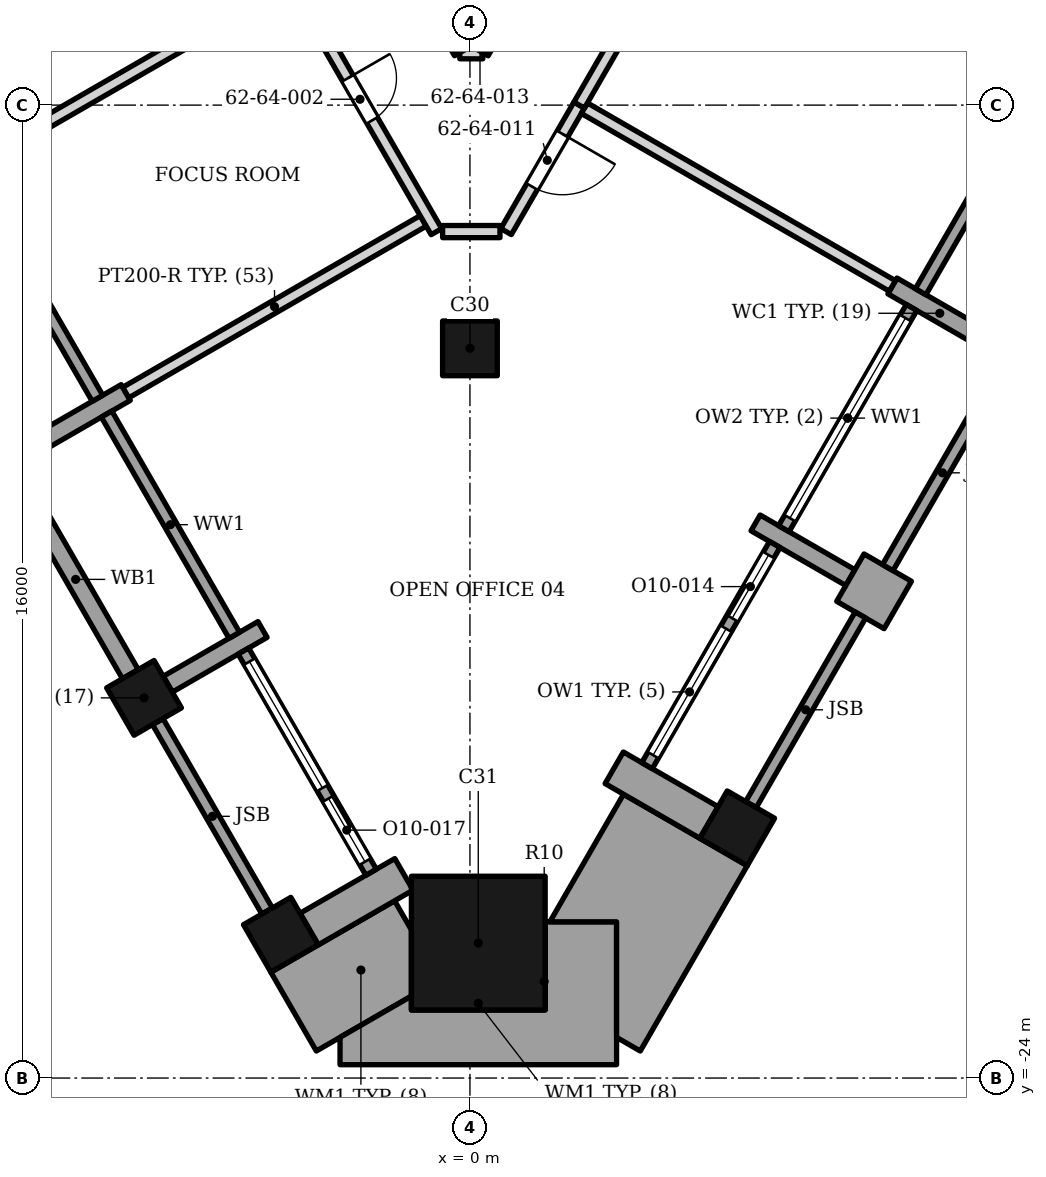
"""IFC4 building model, lengths in metres.
Left out: names, types, materials, properties, quantities, classifications, styles, units other than length and angle.
Written with IfcOpenShell. Run it as: python <this file> out.ifc"""

import sys

from ifc_helpers import new_model, si_unit, direction, frame, frame_2d, origin, origin_2d, place, context, subcontext, project, spatial, polyline, rectangle, outline, extrude, element, fill, save


model = new_model("IFC4")
c1 = context("Model", 3, precision=1e-05, world=origin(), true_north=direction((0.0, 1.0)))
c2 = subcontext(c1, "Body", "Model", "MODEL_VIEW")
j1 = project(units=[si_unit("LENGTHUNIT", "METRE"), si_unit("PLANEANGLEUNIT", "RADIAN")], contexts=[c1])
p1 = place(None, origin())
s1 = spatial("IfcSite", under=j1, at=p1, CompositionType="ELEMENT")
p2 = place(p1, origin())
s2 = spatial("IfcBuilding", under=s1, at=p2, CompositionType="ELEMENT")
p3 = place(p2, frame((0.0, 0.0, 259.9)))
s3 = spatial("IfcBuildingStorey", under=s2, at=p3, CompositionType="ELEMENT", Elevation=259.9)
p4 = place(p3, frame((0.137, -21.781, 0.0), z_axis=(0.0, 0.0, 1.0), x_axis=(0.0, 1.0, 0.0)))
e1 = element("IfcColumn", 1, at=p4, inside=s3, PredefinedType="COLUMN", context=c2, shape_type="SweptSolid", body=[
    extrude(rectangle(XDim=2.2, YDim=2.2, at=origin_2d()), origin(), (0.0, 0.0, 1.0), 3.9),
])
for number, where, z_axis, x_axis in (
    (2, (0.0, -12.0, 0.0), (0.0, 0.0, 1.0), (1.0, 0.0, 0.0)),
    (3, (-5.36, -17.748, 0.0), (0.0, 0.0, 1.0), (0.5, -0.866, 0.0)),
    (4, (-3.11, -21.643, 0.0), (0.0, 0.0, 1.0), (0.5, -0.866, 0.0)),
    (5, (4.396, -19.893, 0.0), (0.0, 0.0, 1.0), (0.5, 0.866, 0.0)),
):
    element("IfcColumn", number, at=place(p3, frame(where, z_axis=z_axis, x_axis=x_axis)), inside=s3, PredefinedType="COLUMN", context=c2, shape_type="SweptSolid", body=[
        extrude(rectangle(XDim=0.9, YDim=0.9, at=origin_2d()), origin(), (0.0, 0.0, 1.0), 3.9),
    ])
for number, where, z_axis, x_axis in (
    (6, (-7.22, -13.626, 0.0), (0.0, 0.0, 1.0), (0.866, 0.5, 0.0)),
    (7, (-4.97, -17.523, 0.0), (0.0, 0.0, 1.0), (0.866, 0.5, 0.0)),
):
    element("IfcWall", number, at=place(p3, frame(where, z_axis=z_axis, x_axis=x_axis)), inside=s3, PredefinedType="SOLIDWALL", context=c2, shape_type="SweptSolid", body=[
        extrude(rectangle(XDim=1.8, YDim=0.3, at=frame_2d((0.9, 0.0))), origin(), (0.0, 0.0, 1.0), 3.0),
    ])
p5 = place(p3, frame((-2.645, -21.55, 0.0), z_axis=(0.0, 0.0, 1.0), x_axis=(0.866047807691, 0.499961193289, 0.0)))
e8 = element("IfcWall", 8, at=p5, inside=s3, PredefinedType="SOLIDWALL", context=c2, shape_type="SweptSolid", body=[
    extrude(rectangle(XDim=1.8, YDim=0.6, at=frame_2d((0.9, 0.0))), origin(), (0.0, 0.0, 1.0), 3.0),
])
p6 = place(p3, frame((-8.226, -9.184, 0.0), z_axis=(0.0, 0.0, 1.0), x_axis=(0.49998411664, -0.866034573852, 0.0)))
e9 = element("IfcWall", 9, at=p6, inside=s3, PredefinedType="ELEMENTEDWALL", context=c2, shape_type="SweptSolid", body=[
    extrude(rectangle(XDim=4.2, YDim=0.2, at=frame_2d((2.1, 0.0))), origin(), (0.0, 0.0, 1.0), 2.95),
])
p7 = place(p3, frame((-5.585, -17.358, 0.0), z_axis=(0.0, 0.0, 1.0), x_axis=(-0.50001992892, 0.866013897511, 0.0)))
e10 = element("IfcWall", 10, at=p7, inside=s3, PredefinedType="SOLIDWALL", context=c2, shape_type="SweptSolid", body=[
    extrude(rectangle(XDim=3.599, YDim=0.3, at=frame_2d((1.8, 0.0))), origin(), (0.0, 0.0, 1.0), 3.0),
])
p8 = place(p3, frame((-5.976, -13.081, 0.0), z_axis=(0.0, 0.0, 1.0), x_axis=(0.499958946799, -0.866049104564, 0.0)))
e11 = element("IfcWall", 11, at=p8, inside=s3, PredefinedType="ELEMENTEDWALL", context=c2, shape_type="SweptSolid", body=[
    extrude(rectangle(XDim=4.2, YDim=0.2, at=frame_2d((2.1, 0.0))), origin(), (0.0, 0.0, 1.0), 3.0),
])
p9 = place(p3, origin())
e12 = element("IfcWall", 12, at=p9, inside=s3, PredefinedType="SOLIDWALL", context=c2, shape_type="SweptSolid", body=[
    extrude(outline(polyline([(-5.221, -18.188), (-3.422, -21.304), (-3.249, -21.204), (-5.048, -18.088), (-5.221, -18.188)])), origin(), (0.0, 0.0, 1.0), 3.0),
])
p10 = place(p3, frame((-3.726, -16.978, 0.0), z_axis=(0.0, 0.0, 1.0), x_axis=(0.49998411664, -0.866034573852, 0.0)))
e13 = element("IfcWall", 13, at=p10, inside=s3, PredefinedType="ELEMENTEDWALL", context=c2, shape_type="SweptSolid", body=[
    extrude(rectangle(XDim=4.2, YDim=0.2, at=frame_2d((2.1, 0.0))), origin(), (0.0, 0.0, 1.0), 3.0),
])
p11 = place(p10, frame((0.2, 0.0, 0.45)))
e14 = element("IfcOpeningElement", 14, at=p11, cuts=e13, PredefinedType="OPENING", context=c2, shape_type="SweptSolid", body=[
    extrude(rectangle(XDim=2.4, YDim=2.25, at=frame_2d((1.2, 1.125))), frame((0.0, 0.11, 0.0), z_axis=(0.0, -1.0, 0.0), x_axis=(1.0, 0.0, 0.0)), (0.0, 0.0, 1.0), 0.22),
])
p12 = place(p10, frame((2.8, 0.0, 0.0)))
e15 = element("IfcOpeningElement", 15, at=p12, cuts=e13, PredefinedType="OPENING", context=c2, shape_type="SweptSolid", body=[
    extrude(rectangle(XDim=1.2, YDim=2.7, at=frame_2d((0.6, 1.35))), frame((0.0, 0.11, 0.0), z_axis=(0.0, -1.0, 0.0), x_axis=(1.0, 0.0, 0.0)), (0.0, 0.0, 1.0), 0.22),
])
p13 = place(p3, frame((3.932, -19.797, 0.0), z_axis=(0.0, 0.0, 1.0), x_axis=(-0.866047807691, 0.499961193289, 0.0)))
e16 = element("IfcWall", 16, at=p13, inside=s3, PredefinedType="SOLIDWALL", context=c2, shape_type="SweptSolid", body=[
    extrude(rectangle(XDim=1.8, YDim=0.6, at=frame_2d((0.9, 0.0))), origin(), (0.0, 0.0, 1.0), 3.0),
])
p14 = place(p3, frame((6.257, -15.771, 0.0), z_axis=(0.0, 0.0, 1.0), x_axis=(0.866013897511, -0.50001992892, 0.0)))
e17 = element("IfcWall", 17, at=p14, inside=s3, PredefinedType="SOLIDWALL", context=c2, shape_type="SweptSolid", body=[
    extrude(rectangle(XDim=0.9, YDim=0.9, at=frame_2d((0.45, 0.0))), origin(), (0.0, 0.0, 1.0), 3.0),
])
p15 = place(p3, frame((4.698, -14.87, 0.0), z_axis=(0.0, 0.0, 1.0), x_axis=(0.865989075817, -0.500062916607, 0.0)))
e18 = element("IfcWall", 18, at=p15, inside=s3, PredefinedType="SOLIDWALL", context=c2, shape_type="SweptSolid", body=[
    extrude(rectangle(XDim=1.8, YDim=0.3, at=frame_2d((0.9, 0.0))), origin(), (0.0, 0.0, 1.0), 3.0),
])
p16 = place(p3, frame((6.948, -10.973, 0.0), z_axis=(0.0, 0.0, 1.0), x_axis=(0.866038726271, -0.499976924066, 0.0)))
e19 = element("IfcWall", 19, at=p16, inside=s3, PredefinedType="SOLIDWALL", context=c2, shape_type="SweptSolid", body=[
    extrude(rectangle(XDim=1.799, YDim=0.3, at=frame_2d((0.9, 0.0))), origin(), (0.0, 0.0, 1.0), 2.95),
])
p17 = place(p3, frame((4.622, -19.503, 0.0), z_axis=(0.0, 0.0, 1.0), x_axis=(0.499961193289, 0.866047807691, 0.0)))
e20 = element("IfcWall", 20, at=p17, inside=s3, PredefinedType="SOLIDWALL", context=c2, shape_type="SweptSolid", body=[
    extrude(rectangle(XDim=3.6, YDim=0.2, at=frame_2d((1.8, 0.0))), origin(), (0.0, 0.0, 1.0), 3.0),
])
p18 = place(p3, frame((2.913, -18.863, 0.0), z_axis=(0.0, 0.0, 1.0), x_axis=(0.500002543286, 0.866023935413, 0.0)))
e21 = element("IfcWall", 21, at=p18, inside=s3, PredefinedType="ELEMENTEDWALL", context=c2, shape_type="SweptSolid", body=[
    extrude(rectangle(XDim=4.2, YDim=0.2, at=frame_2d((2.1, 0.0))), origin(), (0.0, 0.0, 1.0), 3.0),
])
p19 = place(p18, frame((0.2, 0.0, 0.45)))
e22 = element("IfcOpeningElement", 22, at=p19, cuts=e21, PredefinedType="OPENING", context=c2, shape_type="SweptSolid", body=[
    extrude(rectangle(XDim=2.4, YDim=2.25, at=frame_2d((1.2, 1.125))), frame((0.0, 0.11, 0.0), z_axis=(0.0, -1.0, 0.0), x_axis=(1.0, 0.0, 0.0)), (0.0, 0.0, 1.0), 0.22),
])
p20 = place(p18, frame((2.8, 0.0, 0.0)))
e23 = element("IfcOpeningElement", 23, at=p20, cuts=e21, PredefinedType="OPENING", context=c2, shape_type="SweptSolid", body=[
    extrude(rectangle(XDim=1.2, YDim=2.7, at=frame_2d((0.6, 1.35))), frame((0.0, 0.11, 0.0), z_axis=(0.0, -1.0, 0.0), x_axis=(1.0, 0.0, 0.0)), (0.0, 0.0, 1.0), 0.22),
])
p21 = place(p3, frame((6.872, -15.606, 0.0), z_axis=(0.0, 0.0, 1.0), x_axis=(0.499961193289, 0.866047807691, 0.0)))
e24 = element("IfcWall", 24, at=p21, inside=s3, PredefinedType="SOLIDWALL", context=c2, shape_type="SweptSolid", body=[
    extrude(rectangle(XDim=3.6, YDim=0.2, at=frame_2d((1.8, 0.0))), origin(), (0.0, 0.0, 1.0), 3.0),
])
p22 = place(p3, frame((5.163, -14.966, 0.0), z_axis=(0.0, 0.0, 1.0), x_axis=(0.500027713859, 0.866009402589, 0.0)))
e25 = element("IfcWall", 25, at=p22, inside=s3, PredefinedType="ELEMENTEDWALL", context=c2, shape_type="SweptSolid", body=[
    extrude(rectangle(XDim=4.2, YDim=0.2, at=frame_2d((2.1, 0.0))), origin(), (0.0, 0.0, 1.0), 2.95),
])
p23 = place(p22, frame((0.2, 0.0, 0.45)))
e26 = element("IfcOpeningElement", 26, at=p23, cuts=e25, PredefinedType="OPENING", context=c2, shape_type="SweptSolid", body=[
    extrude(rectangle(XDim=3.8, YDim=2.25, at=frame_2d((1.9, 1.125))), frame((0.0, 0.11, 0.0), z_axis=(0.0, -1.0, 0.0), x_axis=(1.0, 0.0, 0.0)), (0.0, 0.0, 1.0), 0.22),
])
p24 = place(p3, frame((7.413, -11.068, 0.0), z_axis=(0.0, 0.0, 1.0), x_axis=(0.500027713859, 0.866009402589, 0.0)))
e27 = element("IfcWall", 27, at=p24, inside=s3, PredefinedType="ELEMENTEDWALL", context=c2, shape_type="SweptSolid", body=[
    extrude(rectangle(XDim=4.2, YDim=0.2, at=frame_2d((2.1, 0.0))), origin(), (0.0, 0.0, 1.0), 3.0),
])
p25 = place(p3, origin())
e28 = element("IfcWall", 28, at=p25, inside=s3, PredefinedType="SOLIDWALL", context=c2, shape_type="SweptSolid", body=[
    extrude(outline(polyline([(-1.239, -21.085), (-3.274, -22.26), (-2.526, -23.556), (-0.963, -22.653), (-0.963, -21.563), (-1.239, -21.085)])), origin(), (0.0, 0.0, 1.0), 3.0),
])
p26 = place(p3, origin())
e29 = element("IfcWall", 29, at=p26, inside=s3, PredefinedType="SOLIDWALL", context=c2, shape_type="SweptSolid", body=[
    extrude(outline(polyline([(-0.963, -22.881), (-0.963, -22.653), (-2.136, -23.331), (-2.136, -23.781), (2.411, -23.781), (2.411, -21.431), (1.237, -21.431), (1.237, -22.881), (-0.963, -22.881)])), origin(), (0.0, 0.0, 1.0), 3.0),
])
p27 = place(p3, origin())
e30 = element("IfcWall", 30, at=p27, inside=s3, PredefinedType="SOLIDWALL", context=c2, shape_type="SweptSolid", body=[
    extrude(outline(polyline([(4.561, -20.507), (2.526, -19.332), (1.314, -21.431), (2.411, -21.431), (2.411, -23.331), (2.801, -23.556), (4.561, -20.507)])), origin(), (0.0, 0.0, 1.0), 3.0),
])
p28 = place(p3, frame((-5.661, -12.727, 0.0), z_axis=(0.0, 0.0, 1.0), x_axis=(0.866171915947, 0.499746147583, 0.0)))
e31 = element("IfcWall", 31, at=p28, inside=s3, PredefinedType="PARTITIONING", context=c2, shape_type="SweptSolid", body=[
    extrude(rectangle(XDim=5.649, YDim=0.2, at=frame_2d((2.825, 0.0))), origin(), (0.0, 0.0, 1.0), 2.884),
])
p29 = place(p3, frame((-7.433, 1.839, 0.0), z_axis=(0.0, 0.0, 1.0), x_axis=(0.500005992518, -0.866021943975, 0.0)))
e32 = element("IfcWall", 32, at=p29, inside=s3, PredefinedType="PARTITIONING", context=c2, shape_type="SweptSolid", body=[
    extrude(rectangle(XDim=13.764, YDim=0.2, at=frame_2d((6.882, 0.0))), origin(), (0.0, 0.0, 1.0), 2.884),
])
p30 = place(p29, frame((3.7, 0.0, 0.0)))
e33 = element("IfcOpeningElement", 33, at=p30, cuts=e32, PredefinedType="OPENING", context=c2, shape_type="SweptSolid", body=[
    extrude(rectangle(XDim=1.6, YDim=2.1, at=frame_2d((0.8, 1.05))), frame((0.0, 0.11, 0.0), z_axis=(0.0, -1.0, 0.0), x_axis=(1.0, 0.0, 0.0)), (0.0, 0.0, 1.0), 0.22),
])
p31 = place(p29, frame((10.85, 0.0, 0.0)))
e34 = element("IfcOpeningElement", 34, at=p31, cuts=e32, PredefinedType="OPENING", context=c2, shape_type="SweptSolid", body=[
    extrude(rectangle(XDim=0.8, YDim=2.1, at=frame_2d((0.4, 1.05))), frame((0.0, 0.11, 0.0), z_axis=(0.0, -1.0, 0.0), x_axis=(1.0, 0.0, 0.0)), (0.0, 0.0, 1.0), 0.22),
])
p32 = place(p3, frame((-0.449, -10.08, 0.0), z_axis=(0.0, 0.0, 1.0), x_axis=(0.999999966511, 0.000258799163, 0.0)))
e35 = element("IfcWall", 35, at=p32, inside=s3, PredefinedType="PARTITIONING", context=c2, shape_type="SweptSolid", body=[
    extrude(rectangle(XDim=0.943, YDim=0.2, at=frame_2d((0.472, 0.0))), origin(), (0.0, 0.0, 1.0), 3.73),
])
p33 = place(p3, frame((0.594, -10.08, 0.0), z_axis=(0.0, 0.0, 1.0), x_axis=(0.500575540498, 0.865692860231, 0.0)))
e36 = element("IfcWall", 36, at=p33, inside=s3, PredefinedType="PARTITIONING", context=c2, shape_type="SweptSolid", body=[
    extrude(rectangle(XDim=2.403, YDim=0.2, at=frame_2d((1.201, 0.0))), origin(), (0.0, 0.0, 1.0), 3.73),
])
p34 = place(p33, frame((0.854, 0.0, 0.0)))
e37 = element("IfcOpeningElement", 37, at=p34, cuts=e36, PredefinedType="OPENING", context=c2, shape_type="SweptSolid", body=[
    extrude(rectangle(XDim=1.0, YDim=2.1, at=frame_2d((0.5, 1.05))), frame((0.0, 0.11, 0.0), z_axis=(0.0, -1.0, 0.0), x_axis=(1.0, 0.0, 0.0)), (0.0, 0.0, 1.0), 0.22),
])
p35 = place(p3, frame((1.881, -8.05, 0.0), z_axis=(0.0, 0.0, 1.0), x_axis=(0.86614736797, -0.499788692307, 0.0)))
e38 = element("IfcWall", 38, at=p35, inside=s3, PredefinedType="PARTITIONING", context=c2, shape_type="SweptSolid", body=[
    extrude(rectangle(XDim=5.85, YDim=0.2, at=frame_2d((2.925, 0.0))), origin(), (0.0, 0.0, 1.0), 2.884),
])
p36 = place(p3, frame((-0.167, -7.138, 0.0), z_axis=(0.0, 0.0, 1.0), x_axis=(0.999996687272, -0.002573994047, 0.0)))
e39 = element("IfcWall", 39, at=p36, inside=s3, PredefinedType="PARTITIONING", context=c2, shape_type="SweptSolid", body=[
    extrude(rectangle(XDim=0.379, YDim=0.2, at=frame_2d((0.19, 0.0))), origin(), (0.0, 0.0, 1.0), 3.73),
])
p37 = place(p3, frame((0.212, -7.139, 0.0), z_axis=(0.0, 0.0, 1.0), x_axis=(0.499990649477, 0.866030802244, 0.0)))
e40 = element("IfcWall", 40, at=p37, inside=s3, PredefinedType="PARTITIONING", context=c2, shape_type="SweptSolid", body=[
    extrude(rectangle(XDim=12.135, YDim=0.2, at=frame_2d((6.067, 0.0))), origin(), (0.0, 0.0, 1.0), 2.884),
])
p38 = place(p37, frame((5.567, 0.0, 0.0)))
e41 = element("IfcOpeningElement", 41, at=p38, cuts=e40, PredefinedType="OPENING", context=c2, shape_type="SweptSolid", body=[
    extrude(rectangle(XDim=1.0, YDim=2.1, at=frame_2d((0.5, 1.05))), frame((0.0, 0.11, 0.0), z_axis=(0.0, -1.0, 0.0), x_axis=(1.0, 0.0, 0.0)), (0.0, 0.0, 1.0), 0.22),
])
p39 = place(p3, frame((-7.911, -8.829, 0.0), z_axis=(0.0, 0.0, 1.0), x_axis=(0.866174794958, 0.49974115758, 0.0)))
e42 = element("IfcWall", 42, at=p39, inside=s3, PredefinedType="PARTITIONING", context=c2, shape_type="SweptSolid", body=[
    extrude(rectangle(XDim=5.65, YDim=0.2, at=frame_2d((2.825, 0.0))), origin(), (0.0, 0.0, 1.0), 2.884),
])
p40 = place(p3, frame((-2.968, -2.287, 0.0), z_axis=(0.0, 0.0, 1.0), x_axis=(0.499996582779, -0.866027376709, 0.0)))
e43 = element("IfcWall", 43, at=p40, inside=s3, PredefinedType="PARTITIONING", context=c2, shape_type="SweptSolid", body=[
    extrude(rectangle(XDim=5.602, YDim=0.2, at=frame_2d((2.801, 0.0))), origin(), (0.0, 0.0, 1.0), 2.884),
])
p41 = place(p3, frame((1.797, -7.999, 0.0), z_axis=(0.0, 0.0, 1.0), x_axis=(0.5000018851, 0.866024315419, 0.0)))
e44 = element("IfcWall", 44, at=p41, inside=s3, PredefinedType="PARTITIONING", context=c2, shape_type="SweptSolid", body=[
    extrude(rectangle(XDim=9.0, YDim=0.2, at=frame_2d((4.5, 0.0))), origin(), (0.0, 0.0, 1.0), 2.884),
])
p42 = place(p41, frame((3.6, 0.0, 0.0)))
e45 = element("IfcOpeningElement", 45, at=p42, cuts=e44, PredefinedType="OPENING", context=c2, shape_type="SweptSolid", body=[
    extrude(rectangle(XDim=1.8, YDim=2.4, at=frame_2d((0.9, 1.2))), frame((0.0, 0.11, 0.0), z_axis=(0.0, -1.0, 0.0), x_axis=(1.0, 0.0, 0.0)), (0.0, 0.0, 1.0), 0.22),
])
p43 = place(p11, origin())
e46 = element("IfcWindow", 46, at=p43, inside=s3, PartitioningType="SINGLE_PANEL", PredefinedType="WINDOW", context=c2, shape_type="SweptSolid", body=[
    extrude(rectangle(XDim=2.4, YDim=2.25, at=frame_2d((1.2, 1.125))), frame((0.0, 0.03, 0.0), z_axis=(0.0, -1.0, 0.0), x_axis=(1.0, 0.0, 0.0)), (0.0, 0.0, 1.0), 0.06),
])
fill(e14, e46)
p44 = place(p12, origin())
e47 = element("IfcDoor", 47, at=p44, inside=s3, OperationType="SINGLE_SWING_LEFT", PredefinedType="DOOR", context=c2, shape_type="SweptSolid", body=[
    extrude(rectangle(XDim=1.2, YDim=2.7, at=frame_2d((0.6, 1.35))), frame((0.0, 0.025, 0.0), z_axis=(0.0, -1.0, 0.0), x_axis=(1.0, 0.0, 0.0)), (0.0, 0.0, 1.0), 0.05),
])
fill(e15, e47)
p45 = place(p19, origin())
e48 = element("IfcWindow", 48, at=p45, inside=s3, PartitioningType="SINGLE_PANEL", PredefinedType="WINDOW", context=c2, shape_type="SweptSolid", body=[
    extrude(rectangle(XDim=2.4, YDim=2.25, at=frame_2d((1.2, 1.125))), frame((0.0, 0.03, 0.0), z_axis=(0.0, -1.0, 0.0), x_axis=(1.0, 0.0, 0.0)), (0.0, 0.0, 1.0), 0.06),
])
fill(e22, e48)
p46 = place(p20, origin())
e49 = element("IfcDoor", 49, at=p46, inside=s3, OperationType="SINGLE_SWING_LEFT", PredefinedType="DOOR", context=c2, shape_type="SweptSolid", body=[
    extrude(rectangle(XDim=1.2, YDim=2.7, at=frame_2d((0.6, 1.35))), frame((0.0, 0.025, 0.0), z_axis=(0.0, -1.0, 0.0), x_axis=(1.0, 0.0, 0.0)), (0.0, 0.0, 1.0), 0.05),
])
fill(e23, e49)
p47 = place(p23, origin())
e50 = element("IfcWindow", 50, at=p47, inside=s3, PartitioningType="SINGLE_PANEL", PredefinedType="WINDOW", context=c2, shape_type="SweptSolid", body=[
    extrude(rectangle(XDim=3.8, YDim=2.25, at=frame_2d((1.9, 1.125))), frame((0.0, 0.03, 0.0), z_axis=(0.0, -1.0, 0.0), x_axis=(1.0, 0.0, 0.0)), (0.0, 0.0, 1.0), 0.06),
])
fill(e26, e50)
p48 = place(p31, origin())
e51 = element("IfcDoor", 51, at=p48, inside=s3, OperationType="SINGLE_SWING_LEFT", PredefinedType="DOOR", context=c2, shape_type="SweptSolid", body=[
    extrude(rectangle(XDim=0.8, YDim=2.1, at=frame_2d((0.4, 1.05))), frame((0.0, 0.025, 0.0), z_axis=(0.0, -1.0, 0.0), x_axis=(1.0, 0.0, 0.0)), (0.0, 0.0, 1.0), 0.05),
])
fill(e34, e51)
p49 = place(p34, origin())
e52 = element("IfcDoor", 52, at=p49, inside=s3, OperationType="SINGLE_SWING_RIGHT", PredefinedType="DOOR", context=c2, shape_type="SweptSolid", body=[
    extrude(rectangle(XDim=1.0, YDim=2.1, at=frame_2d((0.5, 1.05))), frame((0.0, 0.025, 0.0), z_axis=(0.0, -1.0, 0.0), x_axis=(1.0, 0.0, 0.0)), (0.0, 0.0, 1.0), 0.05),
])
fill(e37, e52)
save(model, sys.argv[1])
